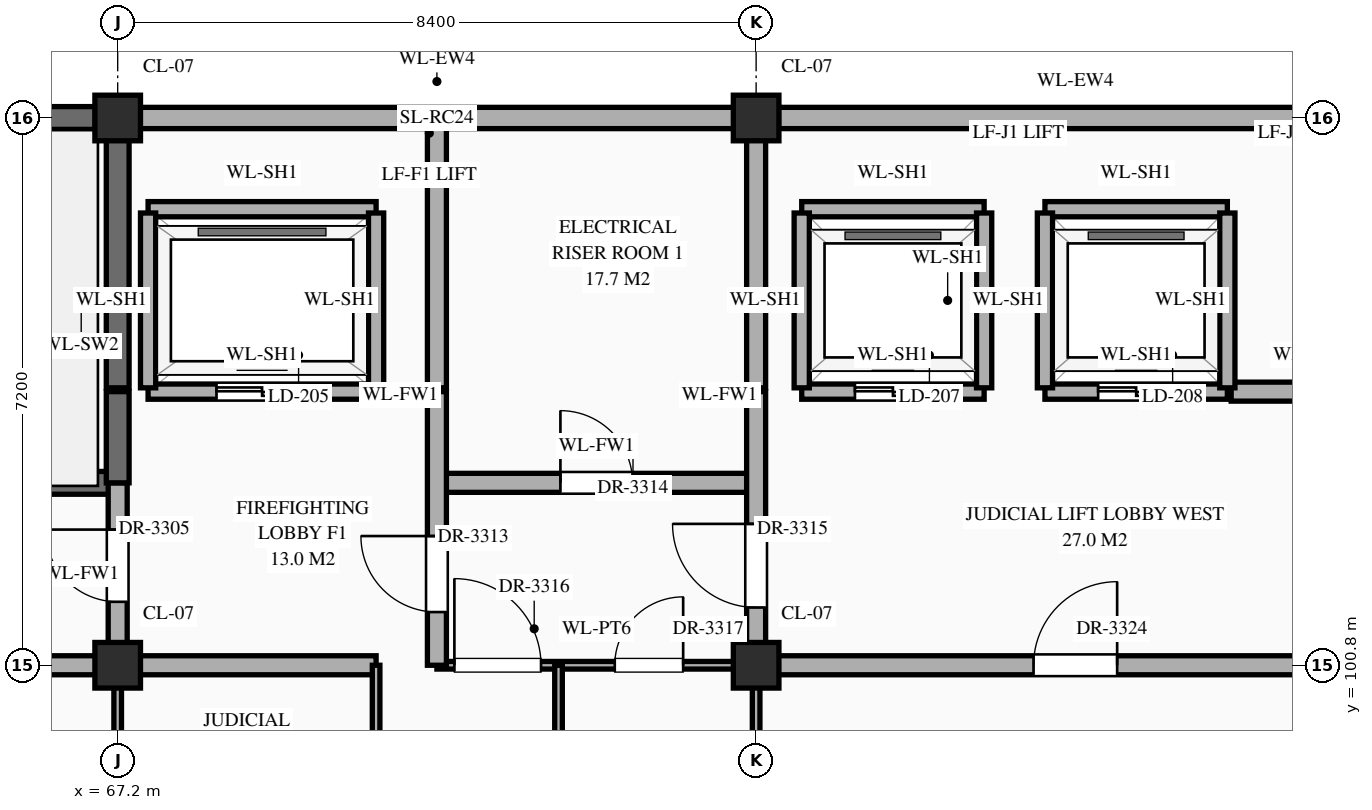
"""IFC4 building model, lengths in metres.
Left out: names, types, materials, properties, quantities, classifications, styles, units other than length and angle.
Written with IfcOpenShell. Run it as: python <this file> out.ifc"""

import sys

from ifc_helpers import new_model, si_unit, direction, frame, frame_2d, origin, origin_2d, place, context, subcontext, project, spatial, rectangle, extrude, element, fill, save


model = new_model("IFC4")
c1 = context("Model", 3, precision=1e-05, world=origin(), true_north=direction((0.0, 1.0)))
c2 = subcontext(c1, "Body", "Model", "MODEL_VIEW")
j1 = project(units=[si_unit("LENGTHUNIT", "METRE"), si_unit("PLANEANGLEUNIT", "RADIAN")], contexts=[c1])
p1 = place(None, origin())
s1 = spatial("IfcSite", under=j1, at=p1, CompositionType="ELEMENT")
p2 = place(p1, origin())
s2 = spatial("IfcBuilding", under=s1, at=p2, CompositionType="ELEMENT")
p3 = place(p2, frame((0.0, 0.0, 64.5)))
s3 = spatial("IfcBuildingStorey", under=s2, at=p3, CompositionType="ELEMENT", Elevation=64.5)
for number, where, z_axis, x_axis in (
    (1, (67.2, 100.8, 0.0), (0.0, 0.0, 1.0), (1.0, 0.0, 0.0)),
    (2, (67.2, 108.0, 0.0), (0.0, 0.0, 1.0), (1.0, 0.0, 0.0)),
    (3, (75.6, 100.8, 0.0), (0.0, 0.0, 1.0), (1.0, 0.0, 0.0)),
    (4, (75.6, 108.0, 0.0), (0.0, 0.0, 1.0), (1.0, 0.0, 0.0)),
):
    element("IfcColumn", number, at=place(p3, frame(where, z_axis=z_axis, x_axis=x_axis)), inside=s3, PredefinedType="COLUMN", context=c2, shape_type="SweptSolid", body=[
        extrude(rectangle(XDim=0.6, YDim=0.6, at=origin_2d()), origin(), (0.0, 0.0, 1.0), 4.2),
    ])
p4 = place(p3, frame((59.095, 108.0, 0.0), z_axis=(0.0, 0.0, 1.0), x_axis=(1.0, 0.0, 0.0)))
e5 = element("IfcWall", 5, at=p4, inside=s3, PredefinedType="SHEAR", context=c2, shape_type="SweptSolid", body=[
    extrude(rectangle(XDim=7.81, YDim=0.3, at=frame_2d((3.905, 0.0))), origin(), (0.0, 0.0, 1.0), 3.95),
])
p5 = place(p3, frame((67.495, 108.0, 0.0), z_axis=(0.0, 0.0, 1.0), x_axis=(1.0, 0.0, 0.0)))
e6 = element("IfcWall", 6, at=p5, inside=s3, PredefinedType="STANDARD", context=c2, shape_type="SweptSolid", body=[
    extrude(rectangle(XDim=7.81, YDim=0.28, at=frame_2d((3.905, 0.0))), origin(), (0.0, 0.0, 1.0), 3.3),
])
p6 = place(p3, frame((75.895, 108.0, 0.0), z_axis=(0.0, 0.0, 1.0), x_axis=(1.0, 0.0, 0.0)))
e7 = element("IfcWall", 7, at=p6, inside=s3, PredefinedType="STANDARD", context=c2, shape_type="SweptSolid", body=[
    extrude(rectangle(XDim=7.81, YDim=0.28, at=frame_2d((3.905, 0.0))), origin(), (0.0, 0.0, 1.0), 3.3),
])
p7 = place(p3, frame((58.84, 100.8, 0.0), z_axis=(0.0, 0.0, 1.0), x_axis=(1.0, 0.0, 0.0)))
e8 = element("IfcWall", 8, at=p7, inside=s3, PredefinedType="STANDARD", context=c2, shape_type="SweptSolid", body=[
    extrude(rectangle(XDim=11.76, YDim=0.25, at=frame_2d((5.88, 0.0))), origin(), (0.0, 0.0, 1.0), 3.1),
])
p8 = place(p7, frame((3.61, 0.0, 0.0)))
e9 = element("IfcOpeningElement", 9, at=p8, cuts=e8, PredefinedType="OPENING", context=c2, shape_type="SweptSolid", body=[
    extrude(rectangle(XDim=1.1, YDim=2.2, at=frame_2d((0.55, 1.1))), frame((0.0, 0.137, 0.0), z_axis=(0.0, -1.0, 0.0), x_axis=(1.0, 0.0, 0.0)), (0.0, 0.0, 1.0), 0.274),
])
p9 = place(p3, frame((71.4, 100.8, 0.0), z_axis=(0.0, 0.0, 1.0), x_axis=(1.0, 0.0, 0.0)))
e10 = element("IfcWall", 10, at=p9, inside=s3, PredefinedType="STANDARD", context=c2, shape_type="SweptSolid", body=[
    extrude(rectangle(XDim=4.2, YDim=0.1, at=frame_2d((2.1, 0.0))), origin(), (0.0, 0.0, 1.0), 3.1),
])
p10 = place(p9, frame((0.23, 0.0, 0.0)))
e11 = element("IfcOpeningElement", 11, at=p10, cuts=e10, PredefinedType="OPENING", context=c2, shape_type="SweptSolid", body=[
    extrude(rectangle(XDim=1.14, YDim=2.4, at=frame_2d((0.57, 1.2))), frame((0.0, 0.062, 0.0), z_axis=(0.0, -1.0, 0.0), x_axis=(1.0, 0.0, 0.0)), (0.0, 0.0, 1.0), 0.124),
])
p11 = place(p9, frame((2.34, 0.0, 0.0)))
e12 = element("IfcOpeningElement", 12, at=p11, cuts=e10, PredefinedType="OPENING", context=c2, shape_type="SweptSolid", body=[
    extrude(rectangle(XDim=0.9, YDim=2.15, at=frame_2d((0.45, 1.075))), frame((0.0, 0.062, 0.0), z_axis=(0.0, -1.0, 0.0), x_axis=(1.0, 0.0, 0.0)), (0.0, 0.0, 1.0), 0.124),
])
p12 = place(p3, frame((75.6, 100.8, 0.0), z_axis=(0.0, 0.0, 1.0), x_axis=(1.0, 0.0, 0.0)))
e13 = element("IfcWall", 13, at=p12, inside=s3, PredefinedType="STANDARD", context=c2, shape_type="SweptSolid", body=[
    extrude(rectangle(XDim=16.8, YDim=0.25, at=frame_2d((8.4, 0.0))), origin(), (0.0, 0.0, 1.0), 3.1),
])
p13 = place(p12, frame((3.65, 0.0, 0.0)))
e14 = element("IfcOpeningElement", 14, at=p13, cuts=e13, PredefinedType="OPENING", context=c2, shape_type="SweptSolid", body=[
    extrude(rectangle(XDim=1.1, YDim=2.2, at=frame_2d((0.55, 1.1))), frame((0.0, 0.137, 0.0), z_axis=(0.0, -1.0, 0.0), x_axis=(1.0, 0.0, 0.0)), (0.0, 0.0, 1.0), 0.274),
])
p14 = place(p12, frame((12.1, 0.0, 0.0)))
e15 = element("IfcOpeningElement", 15, at=p14, cuts=e13, PredefinedType="OPENING", context=c2, shape_type="SweptSolid", body=[
    extrude(rectangle(XDim=1.0, YDim=2.2, at=frame_2d((0.5, 1.1))), frame((0.0, 0.137, 0.0), z_axis=(0.0, -1.0, 0.0), x_axis=(1.0, 0.0, 0.0)), (0.0, 0.0, 1.0), 0.274),
])
p15 = place(p3, frame((58.84, 103.2, 0.0), z_axis=(0.0, 0.0, 1.0), x_axis=(1.0, 0.0, 0.0)))
e16 = element("IfcWall", 16, at=p15, inside=s3, PredefinedType="SHEAR", context=c2, shape_type="SweptSolid", body=[
    extrude(rectangle(XDim=8.36, YDim=0.3, at=frame_2d((4.18, 0.0))), origin(), (0.0, 0.0, 1.0), 3.95),
])
p16 = place(p15, frame((0.61, 0.0, 0.0)))
e17 = element("IfcOpeningElement", 17, at=p16, cuts=e16, PredefinedType="OPENING", context=c2, shape_type="SweptSolid", body=[
    extrude(rectangle(XDim=1.1, YDim=2.2, at=frame_2d((0.55, 1.1))), frame((0.0, 0.162, 0.0), z_axis=(0.0, -1.0, 0.0), x_axis=(1.0, 0.0, 0.0)), (0.0, 0.0, 1.0), 0.324),
])
p17 = place(p3, frame((71.4, 103.2, 0.0), z_axis=(0.0, 0.0, 1.0), x_axis=(1.0, 0.0, 0.0)))
e18 = element("IfcWall", 18, at=p17, inside=s3, PredefinedType="STANDARD", context=c2, shape_type="SweptSolid", body=[
    extrude(rectangle(XDim=4.2, YDim=0.25, at=frame_2d((2.1, 0.0))), origin(), (0.0, 0.0, 1.0), 3.95),
])
p18 = place(p17, frame((1.625, 0.0, 0.0)))
e19 = element("IfcOpeningElement", 19, at=p18, cuts=e18, PredefinedType="OPENING", context=c2, shape_type="SweptSolid", body=[
    extrude(rectangle(XDim=0.95, YDim=2.15, at=frame_2d((0.475, 1.075))), frame((0.0, 0.137, 0.0), z_axis=(0.0, -1.0, 0.0), x_axis=(1.0, 0.0, 0.0)), (0.0, 0.0, 1.0), 0.274),
])
p19 = place(p3, frame((67.6, 104.4, 0.0), z_axis=(0.0, 0.0, 1.0), x_axis=(1.0, 0.0, 0.0)))
e20 = element("IfcWall", 20, at=p19, inside=s3, PredefinedType="STANDARD", context=c2, shape_type="SweptSolid", body=[
    extrude(rectangle(XDim=3.0, YDim=0.2, at=frame_2d((1.5, 0.0))), origin(), (0.0, 0.0, 1.0), 3.95),
])
p20 = place(p19, frame((0.9, 0.0, 0.0)))
e21 = element("IfcOpeningElement", 21, at=p20, cuts=e20, PredefinedType="OPENING", context=c2, shape_type="SweptSolid", body=[
    extrude(rectangle(XDim=1.2, YDim=2.15, at=frame_2d((0.6, 1.075))), frame((0.0, 0.112, 0.0), z_axis=(0.0, -1.0, 0.0), x_axis=(1.0, 0.0, 0.0)), (0.0, 0.0, 1.0), 0.224),
])
p21 = place(p3, frame((76.2, 104.4, 0.0), z_axis=(0.0, 0.0, 1.0), x_axis=(1.0, 0.0, 0.0)))
e22 = element("IfcWall", 22, at=p21, inside=s3, PredefinedType="STANDARD", context=c2, shape_type="SweptSolid", body=[
    extrude(rectangle(XDim=2.4, YDim=0.2, at=frame_2d((1.2, 0.0))), origin(), (0.0, 0.0, 1.0), 3.95),
])
p22 = place(p21, frame((0.7, 0.0, 0.0)))
e23 = element("IfcOpeningElement", 23, at=p22, cuts=e22, PredefinedType="OPENING", context=c2, shape_type="SweptSolid", body=[
    extrude(rectangle(XDim=1.0, YDim=2.15, at=frame_2d((0.5, 1.075))), frame((0.0, 0.112, 0.0), z_axis=(0.0, -1.0, 0.0), x_axis=(1.0, 0.0, 0.0)), (0.0, 0.0, 1.0), 0.224),
])
p23 = place(p3, frame((79.4, 104.4, 0.0), z_axis=(0.0, 0.0, 1.0), x_axis=(1.0, 0.0, 0.0)))
e24 = element("IfcWall", 24, at=p23, inside=s3, PredefinedType="STANDARD", context=c2, shape_type="SweptSolid", body=[
    extrude(rectangle(XDim=2.4, YDim=0.2, at=frame_2d((1.2, 0.0))), origin(), (0.0, 0.0, 1.0), 3.95),
])
p24 = place(p23, frame((0.7, 0.0, 0.0)))
e25 = element("IfcOpeningElement", 25, at=p24, cuts=e24, PredefinedType="OPENING", context=c2, shape_type="SweptSolid", body=[
    extrude(rectangle(XDim=1.0, YDim=2.15, at=frame_2d((0.5, 1.075))), frame((0.0, 0.112, 0.0), z_axis=(0.0, -1.0, 0.0), x_axis=(1.0, 0.0, 0.0)), (0.0, 0.0, 1.0), 0.224),
])
p25 = place(p3, frame((81.85, 104.4, 0.0), z_axis=(0.0, 0.0, 1.0), x_axis=(1.0, 0.0, 0.0)))
e26 = element("IfcWall", 26, at=p25, inside=s3, PredefinedType="STANDARD", context=c2, shape_type="SweptSolid", body=[
    extrude(rectangle(XDim=2.1, YDim=0.25, at=frame_2d((1.05, 0.0))), origin(), (0.0, 0.0, 1.0), 3.95),
])
p26 = place(p3, frame((67.6, 106.8, 0.0), z_axis=(0.0, 0.0, 1.0), x_axis=(1.0, 0.0, 0.0)))
e27 = element("IfcWall", 27, at=p26, inside=s3, PredefinedType="STANDARD", context=c2, shape_type="SweptSolid", body=[
    extrude(rectangle(XDim=3.0, YDim=0.2, at=frame_2d((1.5, 0.0))), origin(), (0.0, 0.0, 1.0), 3.95),
])
for number, where, z_axis, x_axis in (
    (28, (76.2, 106.8, 0.0), (0.0, 0.0, 1.0), (1.0, 0.0, 0.0)),
    (29, (79.4, 106.8, 0.0), (0.0, 0.0, 1.0), (1.0, 0.0, 0.0)),
):
    element("IfcWall", number, at=place(p3, frame(where, z_axis=z_axis, x_axis=x_axis)), inside=s3, PredefinedType="STANDARD", context=c2, shape_type="SweptSolid", body=[
        extrude(rectangle(XDim=2.4, YDim=0.2, at=frame_2d((1.2, 0.0))), origin(), (0.0, 0.0, 1.0), 3.95),
    ])
p27 = place(p3, frame((67.2, 95.35, 0.0), z_axis=(0.0, 0.0, 1.0), x_axis=(0.0, 1.0, 0.0)))
e30 = element("IfcWall", 30, at=p27, inside=s3, PredefinedType="STANDARD", context=c2, shape_type="SweptSolid", body=[
    extrude(rectangle(XDim=5.45, YDim=0.1, at=frame_2d((2.725, 0.0))), origin(), (0.0, 0.0, 1.0), 3.2),
])
p28 = place(p3, frame((67.2, 100.8, 0.0), z_axis=(0.0, 0.0, 1.0), x_axis=(0.0, 1.0, 0.0)))
e31 = element("IfcWall", 31, at=p28, inside=s3, PredefinedType="STANDARD", context=c2, shape_type="SweptSolid", body=[
    extrude(rectangle(XDim=2.4, YDim=0.25, at=frame_2d((1.2, 0.0))), origin(), (0.0, 0.0, 1.0), 3.2),
])
p29 = place(p28, frame((0.835, 0.0, 0.0)))
e32 = element("IfcOpeningElement", 32, at=p29, cuts=e31, PredefinedType="OPENING", context=c2, shape_type="SweptSolid", body=[
    extrude(rectangle(XDim=0.95, YDim=2.15, at=frame_2d((0.475, 1.075))), frame((0.0, 0.137, 0.0), z_axis=(0.0, -1.0, 0.0), x_axis=(1.0, 0.0, 0.0)), (0.0, 0.0, 1.0), 0.274),
])
p30 = place(p3, frame((67.2, 103.2, 0.0), z_axis=(0.0, 0.0, 1.0), x_axis=(0.0, 1.0, 0.0)))
e33 = element("IfcWall", 33, at=p30, inside=s3, PredefinedType="SHEAR", context=c2, shape_type="SweptSolid", body=[
    extrude(rectangle(XDim=1.2, YDim=0.3, at=frame_2d((0.6, 0.0))), origin(), (0.0, 0.0, 1.0), 3.95),
])
p31 = place(p3, frame((67.2, 104.45, 0.0), z_axis=(0.0, 0.0, 1.0), x_axis=(0.0, 1.0, 0.0)))
e34 = element("IfcWall", 34, at=p31, inside=s3, PredefinedType="SHEAR", context=c2, shape_type="SweptSolid", body=[
    extrude(rectangle(XDim=3.46, YDim=0.3, at=frame_2d((1.73, 0.0))), origin(), (0.0, 0.0, 1.0), 3.95),
])
p32 = place(p3, frame((67.6, 104.45, 0.0), z_axis=(0.0, 0.0, 1.0), x_axis=(0.0, 1.0, 0.0)))
e35 = element("IfcWall", 35, at=p32, inside=s3, PredefinedType="STANDARD", context=c2, shape_type="SweptSolid", body=[
    extrude(rectangle(XDim=2.3, YDim=0.2, at=frame_2d((1.15, 0.0))), origin(), (0.0, 0.0, 1.0), 3.95),
])
p33 = place(p3, frame((70.6, 95.35, 0.0), z_axis=(0.0, 0.0, 1.0), x_axis=(0.0, 1.0, 0.0)))
e36 = element("IfcWall", 36, at=p33, inside=s3, PredefinedType="STANDARD", context=c2, shape_type="SweptSolid", body=[
    extrude(rectangle(XDim=5.45, YDim=0.1, at=frame_2d((2.725, 0.0))), origin(), (0.0, 0.0, 1.0), 3.95),
])
p34 = place(p33, frame((2.155, 0.0, 0.0)))
e37 = element("IfcOpeningElement", 37, at=p34, cuts=e36, PredefinedType="OPENING", context=c2, shape_type="SweptSolid", body=[
    extrude(rectangle(XDim=1.14, YDim=2.4, at=frame_2d((0.57, 1.2))), frame((0.0, 0.062, 0.0), z_axis=(0.0, -1.0, 0.0), x_axis=(1.0, 0.0, 0.0)), (0.0, 0.0, 1.0), 0.124),
])
p35 = place(p3, frame((70.6, 104.45, 0.0), z_axis=(0.0, 0.0, 1.0), x_axis=(0.0, 1.0, 0.0)))
e38 = element("IfcWall", 38, at=p35, inside=s3, PredefinedType="STANDARD", context=c2, shape_type="SweptSolid", body=[
    extrude(rectangle(XDim=2.3, YDim=0.2, at=frame_2d((1.15, 0.0))), origin(), (0.0, 0.0, 1.0), 3.95),
])
p36 = place(p3, frame((71.4, 100.8, 0.0), z_axis=(0.0, 0.0, 1.0), x_axis=(0.0, 1.0, 0.0)))
e39 = element("IfcWall", 39, at=p36, inside=s3, PredefinedType="STANDARD", context=c2, shape_type="SweptSolid", body=[
    extrude(rectangle(XDim=3.6, YDim=0.25, at=frame_2d((1.8, 0.0))), origin(), (0.0, 0.0, 1.0), 3.6),
])
p37 = place(p36, frame((0.7, 0.0, 0.0)))
e40 = element("IfcOpeningElement", 40, at=p37, cuts=e39, PredefinedType="OPENING", context=c2, shape_type="SweptSolid", body=[
    extrude(rectangle(XDim=1.0, YDim=2.2, at=frame_2d((0.5, 1.1))), frame((0.0, 0.137, 0.0), z_axis=(0.0, -1.0, 0.0), x_axis=(1.0, 0.0, 0.0)), (0.0, 0.0, 1.0), 0.274),
])
p38 = place(p3, frame((71.4, 104.45, 0.0), z_axis=(0.0, 0.0, 1.0), x_axis=(0.0, 1.0, 0.0)))
e41 = element("IfcWall", 41, at=p38, inside=s3, PredefinedType="STANDARD", context=c2, shape_type="SweptSolid", body=[
    extrude(rectangle(XDim=3.46, YDim=0.25, at=frame_2d((1.73, 0.0))), origin(), (0.0, 0.0, 1.0), 3.6),
])
p39 = place(p3, frame((73.0, 95.35, 0.0), z_axis=(0.0, 0.0, 1.0), x_axis=(0.0, 1.0, 0.0)))
e42 = element("IfcWall", 42, at=p39, inside=s3, PredefinedType="STANDARD", context=c2, shape_type="SweptSolid", body=[
    extrude(rectangle(XDim=5.45, YDim=0.1, at=frame_2d((2.725, 0.0))), origin(), (0.0, 0.0, 1.0), 3.95),
])
p40 = place(p39, frame((2.275, 0.0, 0.0)))
e43 = element("IfcOpeningElement", 43, at=p40, cuts=e42, PredefinedType="OPENING", context=c2, shape_type="SweptSolid", body=[
    extrude(rectangle(XDim=0.9, YDim=2.15, at=frame_2d((0.45, 1.075))), frame((0.0, 0.062, 0.0), z_axis=(0.0, -1.0, 0.0), x_axis=(1.0, 0.0, 0.0)), (0.0, 0.0, 1.0), 0.124),
])
p41 = place(p3, frame((75.6, 95.35, 0.0), z_axis=(0.0, 0.0, 1.0), x_axis=(0.0, 1.0, 0.0)))
e44 = element("IfcWall", 44, at=p41, inside=s3, PredefinedType="STANDARD", context=c2, shape_type="SweptSolid", body=[
    extrude(rectangle(XDim=5.45, YDim=0.1, at=frame_2d((2.725, 0.0))), origin(), (0.0, 0.0, 1.0), 3.2),
])
p42 = place(p3, frame((75.6, 100.8, 0.0), z_axis=(0.0, 0.0, 1.0), x_axis=(0.0, 1.0, 0.0)))
e45 = element("IfcWall", 45, at=p42, inside=s3, PredefinedType="STANDARD", context=c2, shape_type="SweptSolid", body=[
    extrude(rectangle(XDim=3.6, YDim=0.25, at=frame_2d((1.8, 0.0))), origin(), (0.0, 0.0, 1.0), 3.2),
])
p43 = place(p42, frame((0.76, 0.0, 0.0)))
e46 = element("IfcOpeningElement", 46, at=p43, cuts=e45, PredefinedType="OPENING", context=c2, shape_type="SweptSolid", body=[
    extrude(rectangle(XDim=1.1, YDim=2.2, at=frame_2d((0.55, 1.1))), frame((0.0, 0.137, 0.0), z_axis=(0.0, -1.0, 0.0), x_axis=(1.0, 0.0, 0.0)), (0.0, 0.0, 1.0), 0.274),
])
p44 = place(p3, frame((75.6, 104.45, 0.0), z_axis=(0.0, 0.0, 1.0), x_axis=(0.0, 1.0, 0.0)))
e47 = element("IfcWall", 47, at=p44, inside=s3, PredefinedType="STANDARD", context=c2, shape_type="SweptSolid", body=[
    extrude(rectangle(XDim=3.46, YDim=0.25, at=frame_2d((1.73, 0.0))), origin(), (0.0, 0.0, 1.0), 3.2),
])
for number, where, z_axis, x_axis in (
    (48, (76.2, 104.45, 0.0), (0.0, 0.0, 1.0), (0.0, 1.0, 0.0)),
    (49, (78.6, 104.45, 0.0), (0.0, 0.0, 1.0), (0.0, 1.0, 0.0)),
    (50, (79.4, 104.45, 0.0), (0.0, 0.0, 1.0), (0.0, 1.0, 0.0)),
    (51, (81.8, 104.45, 0.0), (0.0, 0.0, 1.0), (0.0, 1.0, 0.0)),
):
    element("IfcWall", number, at=place(p3, frame(where, z_axis=z_axis, x_axis=x_axis)), inside=s3, PredefinedType="STANDARD", context=c2, shape_type="SweptSolid", body=[
        extrude(rectangle(XDim=2.3, YDim=0.2, at=frame_2d((1.15, 0.0))), origin(), (0.0, 0.0, 1.0), 3.95),
    ])
p45 = place(p20, origin())
e52 = element("IfcDoor", 52, at=p45, inside=s3, OperationType="DOUBLE_DOOR_SLIDING", PredefinedType="DOOR", context=c2, shape_type="SweptSolid", body=[
    extrude(rectangle(XDim=1.2, YDim=2.15, at=frame_2d((0.6, 1.075))), frame((0.0, 0.025, 0.0), z_axis=(0.0, -1.0, 0.0), x_axis=(1.0, 0.0, 0.0)), (0.0, 0.0, 1.0), 0.05),
])
fill(e21, e52)
p46 = place(p22, origin())
e53 = element("IfcDoor", 53, at=p46, inside=s3, OperationType="DOUBLE_DOOR_SLIDING", PredefinedType="DOOR", context=c2, shape_type="SweptSolid", body=[
    extrude(rectangle(XDim=1.0, YDim=2.15, at=frame_2d((0.5, 1.075))), frame((0.0, 0.025, 0.0), z_axis=(0.0, -1.0, 0.0), x_axis=(1.0, 0.0, 0.0)), (0.0, 0.0, 1.0), 0.05),
])
fill(e23, e53)
p47 = place(p24, origin())
e54 = element("IfcDoor", 54, at=p47, inside=s3, OperationType="DOUBLE_DOOR_SLIDING", PredefinedType="DOOR", context=c2, shape_type="SweptSolid", body=[
    extrude(rectangle(XDim=1.0, YDim=2.15, at=frame_2d((0.5, 1.075))), frame((0.0, 0.025, 0.0), z_axis=(0.0, -1.0, 0.0), x_axis=(1.0, 0.0, 0.0)), (0.0, 0.0, 1.0), 0.05),
])
fill(e25, e54)
p48 = place(p29, origin())
e55 = element("IfcDoor", 55, at=p48, inside=s3, OperationType="SINGLE_SWING_RIGHT", PredefinedType="DOOR", context=c2, shape_type="SweptSolid", body=[
    extrude(rectangle(XDim=0.95, YDim=2.15, at=frame_2d((0.475, 1.075))), frame((0.0, 0.025, 0.0), z_axis=(0.0, -1.0, 0.0), x_axis=(1.0, 0.0, 0.0)), (0.0, 0.0, 1.0), 0.05),
])
fill(e32, e55)
p49 = place(p37, origin())
e56 = element("IfcDoor", 56, at=p49, inside=s3, OperationType="SINGLE_SWING_RIGHT", PredefinedType="DOOR", context=c2, shape_type="SweptSolid", body=[
    extrude(rectangle(XDim=1.0, YDim=2.2, at=frame_2d((0.5, 1.1))), frame((0.0, 0.025, 0.0), z_axis=(0.0, -1.0, 0.0), x_axis=(1.0, 0.0, 0.0)), (0.0, 0.0, 1.0), 0.05),
])
fill(e40, e56)
p50 = place(p18, origin())
e57 = element("IfcDoor", 57, at=p50, inside=s3, OperationType="SINGLE_SWING_LEFT", PredefinedType="DOOR", context=c2, shape_type="SweptSolid", body=[
    extrude(rectangle(XDim=0.95, YDim=2.15, at=frame_2d((0.475, 1.075))), frame((0.0, 0.025, 0.0), z_axis=(0.0, -1.0, 0.0), x_axis=(1.0, 0.0, 0.0)), (0.0, 0.0, 1.0), 0.05),
])
fill(e19, e57)
p51 = place(p43, origin())
e58 = element("IfcDoor", 58, at=p51, inside=s3, OperationType="SINGLE_SWING_RIGHT", PredefinedType="DOOR", context=c2, shape_type="SweptSolid", body=[
    extrude(rectangle(XDim=1.1, YDim=2.2, at=frame_2d((0.55, 1.1))), frame((0.0, 0.025, 0.0), z_axis=(0.0, -1.0, 0.0), x_axis=(1.0, 0.0, 0.0)), (0.0, 0.0, 1.0), 0.05),
])
fill(e46, e58)
p52 = place(p10, origin())
e59 = element("IfcDoor", 59, at=p52, inside=s3, OperationType="SINGLE_SWING_LEFT", PredefinedType="DOOR", context=c2, shape_type="SweptSolid", body=[
    extrude(rectangle(XDim=1.14, YDim=2.4, at=frame_2d((0.57, 1.2))), frame((0.0, 0.025, 0.0), z_axis=(0.0, -1.0, 0.0), x_axis=(1.0, 0.0, 0.0)), (0.0, 0.0, 1.0), 0.05),
])
fill(e11, e59)
p53 = place(p11, origin())
e60 = element("IfcDoor", 60, at=p53, inside=s3, OperationType="SINGLE_SWING_RIGHT", PredefinedType="DOOR", context=c2, shape_type="SweptSolid", body=[
    extrude(rectangle(XDim=0.9, YDim=2.15, at=frame_2d((0.45, 1.075))), frame((0.0, 0.025, 0.0), z_axis=(0.0, -1.0, 0.0), x_axis=(1.0, 0.0, 0.0)), (0.0, 0.0, 1.0), 0.05),
])
fill(e12, e60)
p54 = place(p13, origin())
e61 = element("IfcDoor", 61, at=p54, inside=s3, OperationType="SINGLE_SWING_RIGHT", PredefinedType="DOOR", context=c2, shape_type="SweptSolid", body=[
    extrude(rectangle(XDim=1.1, YDim=2.2, at=frame_2d((0.55, 1.1))), frame((0.0, 0.025, 0.0), z_axis=(0.0, -1.0, 0.0), x_axis=(1.0, 0.0, 0.0)), (0.0, 0.0, 1.0), 0.05),
])
fill(e14, e61)
save(model, sys.argv[1])
